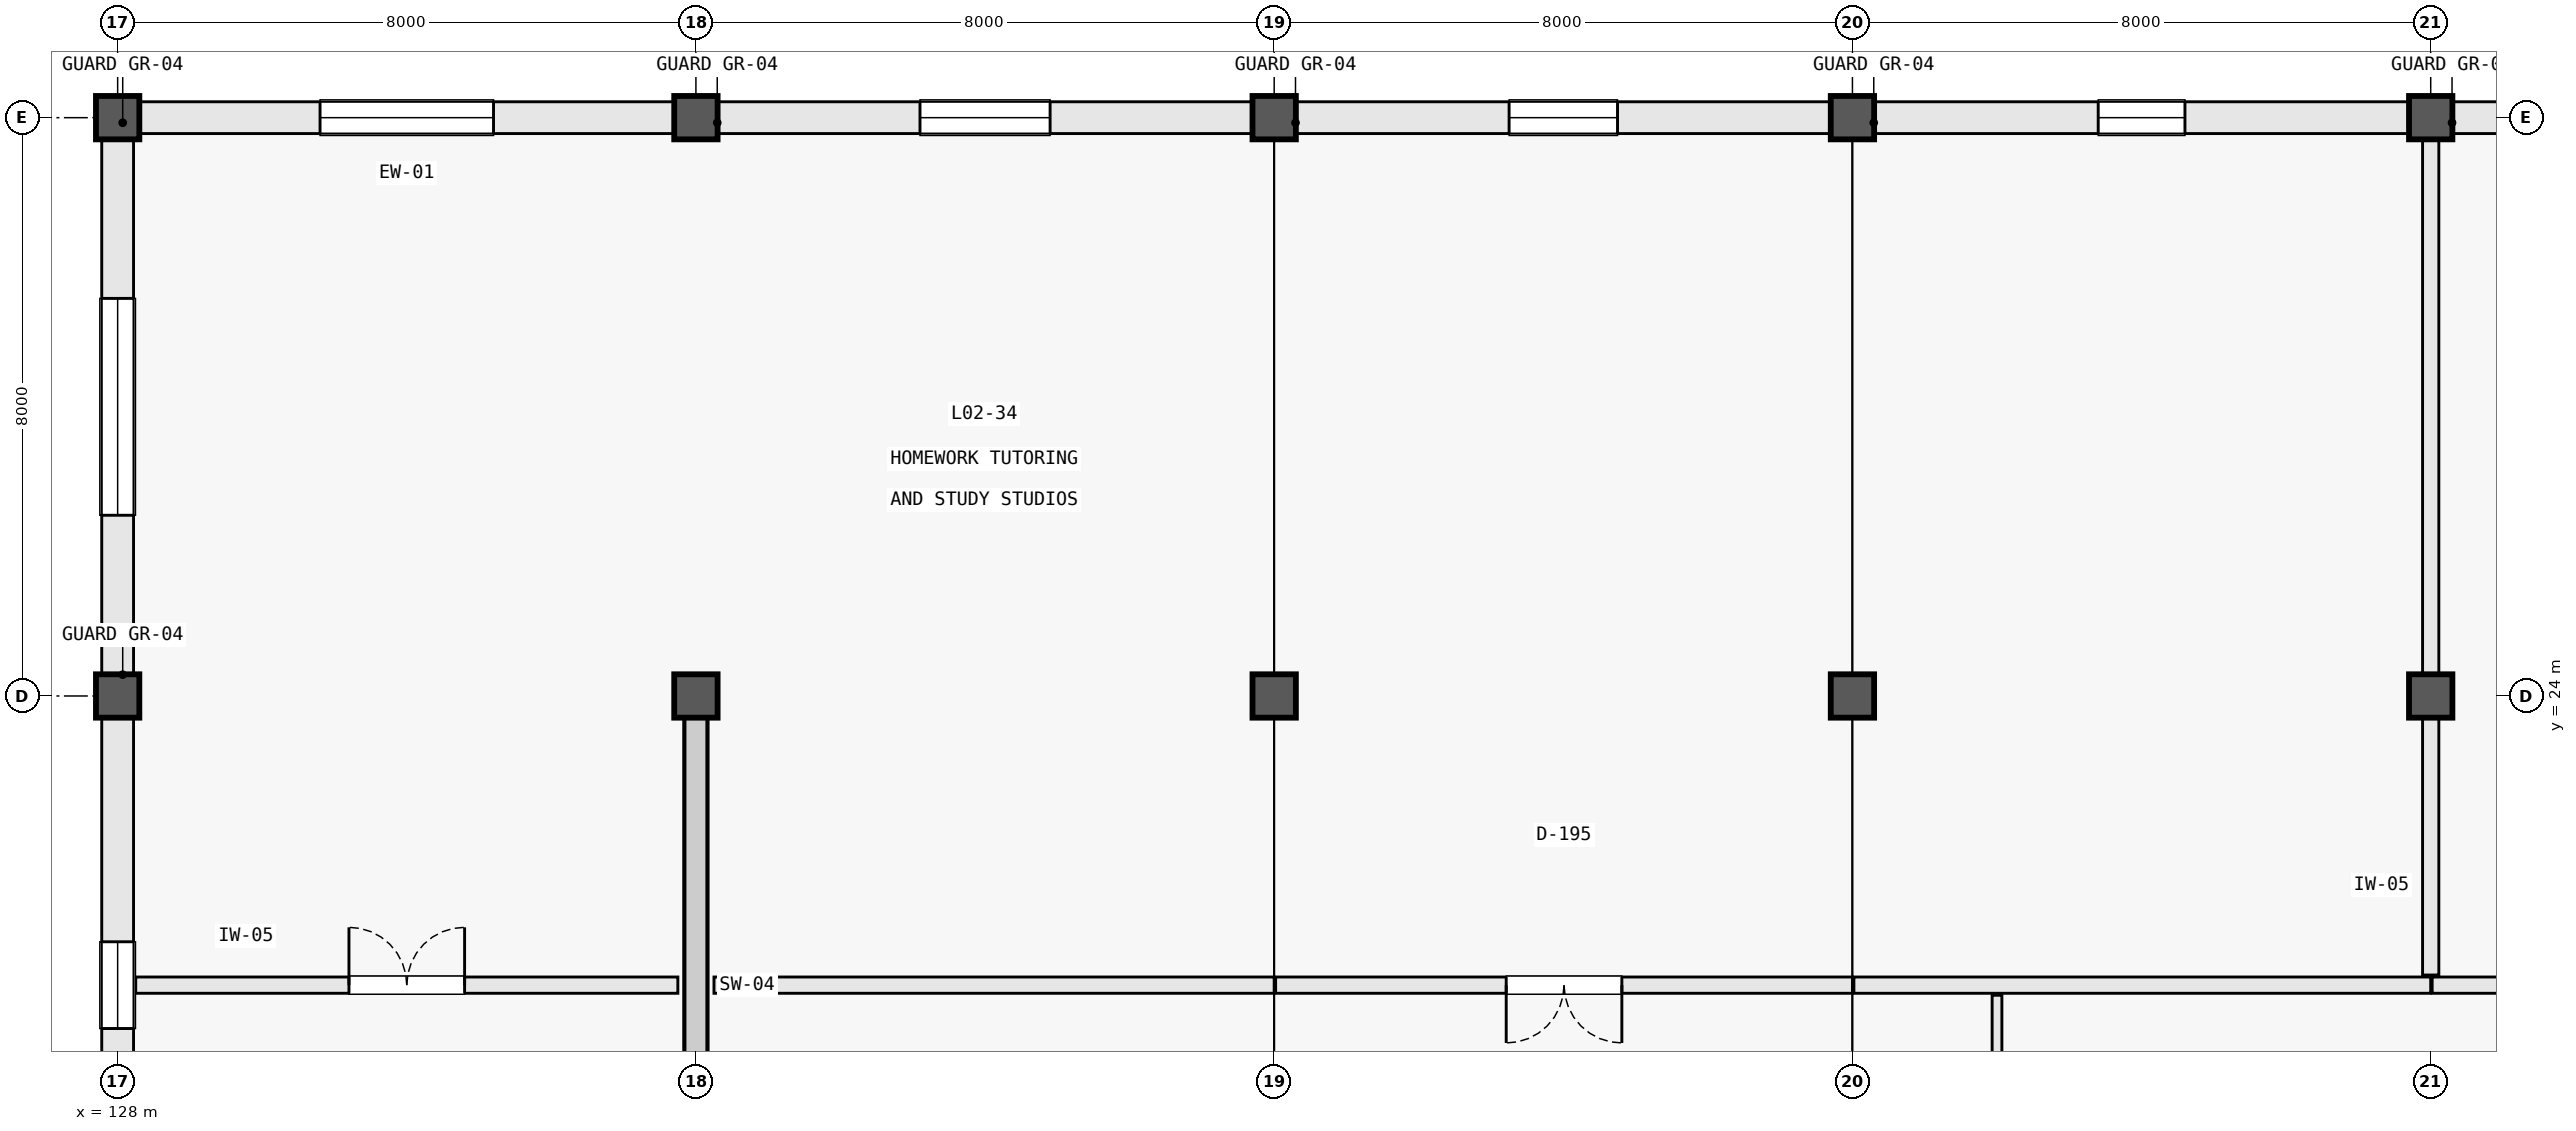
"""IFC4 building model, lengths in metres.
Left out: names, types, materials, properties, quantities, classifications, styles, units other than length and angle.
Written with IfcOpenShell. Run it as: python <this file> out.ifc"""

import sys

from ifc_helpers import new_model, si_unit, direction, frame, frame_2d, origin, origin_2d, place, context, subcontext, project, spatial, rectangle, extrude, element, fill, save


model = new_model("IFC4")
c1 = context("Model", 3, precision=1e-05, world=origin(), true_north=direction((0.0, 1.0)))
c2 = subcontext(c1, "Body", "Model", "MODEL_VIEW")
j1 = project(units=[si_unit("LENGTHUNIT", "METRE"), si_unit("PLANEANGLEUNIT", "RADIAN")], contexts=[c1])
p1 = place(None, origin())
s1 = spatial("IfcSite", under=j1, at=p1, CompositionType="ELEMENT")
p2 = place(p1, origin())
s2 = spatial("IfcBuilding", under=s1, at=p2, CompositionType="ELEMENT")
p3 = place(p2, frame((0.0, 0.0, 5.4)))
s3 = spatial("IfcBuildingStorey", under=s2, at=p3, CompositionType="ELEMENT", Elevation=5.4)
for number, where, z_axis, x_axis in (
    (1, (128.0, 24.0, 0.0), (0.0, 0.0, 1.0), (1.0, 0.0, 0.0)),
    (2, (128.0, 32.0, 0.0), (0.0, 0.0, 1.0), (1.0, 0.0, 0.0)),
    (3, (136.0, 24.0, 0.0), (0.0, 0.0, 1.0), (1.0, 0.0, 0.0)),
    (4, (136.0, 32.0, 0.0), (0.0, 0.0, 1.0), (1.0, 0.0, 0.0)),
    (5, (144.0, 24.0, 0.0), (0.0, 0.0, 1.0), (1.0, 0.0, 0.0)),
    (6, (144.0, 32.0, 0.0), (0.0, 0.0, 1.0), (1.0, 0.0, 0.0)),
    (7, (152.0, 24.0, 0.0), (0.0, 0.0, 1.0), (1.0, 0.0, 0.0)),
    (8, (152.0, 32.0, 0.0), (0.0, 0.0, 1.0), (1.0, 0.0, 0.0)),
    (9, (160.0, 24.0, 0.0), (0.0, 0.0, 1.0), (1.0, 0.0, 0.0)),
    (10, (160.0, 32.0, 0.0), (0.0, 0.0, 1.0), (1.0, 0.0, 0.0)),
):
    element("IfcColumn", number, at=place(p3, frame(where, z_axis=z_axis, x_axis=x_axis)), inside=s3, PredefinedType="COLUMN", context=c2, shape_type="SweptSolid", body=[
        extrude(rectangle(XDim=0.6, YDim=0.6, at=origin_2d()), origin(), (0.0, 0.0, 1.0), 5.1),
    ])
p4 = place(p3, frame((136.0, 16.3, 0.0), z_axis=(0.0, 0.0, 1.0), x_axis=(0.0, 1.0, 0.0)))
e11 = element("IfcWall", 11, at=p4, inside=s3, PredefinedType="SHEAR", context=c2, shape_type="SweptSolid", body=[
    extrude(rectangle(XDim=7.4, YDim=0.32, at=frame_2d((3.7, 0.0))), origin(), (0.0, 0.0, 1.0), 4.76),
])
p5 = place(p3, frame((135.705, 32.0, 0.0), z_axis=(0.0, 0.0, 1.0), x_axis=(-1.0, 0.0, 0.0)))
e12 = element("IfcWall", 12, at=p5, inside=s3, PredefinedType="STANDARD", context=c2, shape_type="SweptSolid", body=[
    extrude(rectangle(XDim=7.41, YDim=0.44, at=frame_2d((3.705, 0.0))), origin(), (0.0, 0.0, 1.0), 3.64),
])
p6 = place(p5, frame((2.505, 0.0, 0.72)))
e13 = element("IfcOpeningElement", 13, at=p6, cuts=e12, PredefinedType="OPENING", context=c2, shape_type="SweptSolid", body=[
    extrude(rectangle(XDim=2.4, YDim=2.6, at=frame_2d((1.2, 1.3))), frame((0.0, 0.232, 0.0), z_axis=(0.0, -1.0, 0.0), x_axis=(1.0, 0.0, 0.0)), (0.0, 0.0, 1.0), 0.464),
])
p7 = place(p3, frame((143.705, 32.0, 0.0), z_axis=(0.0, 0.0, 1.0), x_axis=(-1.0, 0.0, 0.0)))
e14 = element("IfcWall", 14, at=p7, inside=s3, PredefinedType="STANDARD", context=c2, shape_type="SweptSolid", body=[
    extrude(rectangle(XDim=7.41, YDim=0.44, at=frame_2d((3.705, 0.0))), origin(), (0.0, 0.0, 1.0), 3.64),
])
p8 = place(p7, frame((2.805, 0.0, 0.72)))
e15 = element("IfcOpeningElement", 15, at=p8, cuts=e14, PredefinedType="OPENING", context=c2, shape_type="SweptSolid", body=[
    extrude(rectangle(XDim=1.8, YDim=2.1, at=frame_2d((0.9, 1.05))), frame((0.0, 0.232, 0.0), z_axis=(0.0, -1.0, 0.0), x_axis=(1.0, 0.0, 0.0)), (0.0, 0.0, 1.0), 0.464),
])
p9 = place(p3, frame((151.705, 32.0, 0.0), z_axis=(0.0, 0.0, 1.0), x_axis=(-1.0, 0.0, 0.0)))
e16 = element("IfcWall", 16, at=p9, inside=s3, PredefinedType="STANDARD", context=c2, shape_type="SweptSolid", body=[
    extrude(rectangle(XDim=7.41, YDim=0.44, at=frame_2d((3.705, 0.0))), origin(), (0.0, 0.0, 1.0), 3.64),
])
p10 = place(p9, frame((2.955, 0.0, 0.72)))
e17 = element("IfcOpeningElement", 17, at=p10, cuts=e16, PredefinedType="OPENING", context=c2, shape_type="SweptSolid", body=[
    extrude(rectangle(XDim=1.5, YDim=1.8, at=frame_2d((0.75, 0.9))), frame((0.0, 0.232, 0.0), z_axis=(0.0, -1.0, 0.0), x_axis=(1.0, 0.0, 0.0)), (0.0, 0.0, 1.0), 0.464),
])
p11 = place(p3, frame((159.705, 32.0, 0.0), z_axis=(0.0, 0.0, 1.0), x_axis=(-1.0, 0.0, 0.0)))
e18 = element("IfcWall", 18, at=p11, inside=s3, PredefinedType="STANDARD", context=c2, shape_type="SweptSolid", body=[
    extrude(rectangle(XDim=7.41, YDim=0.44, at=frame_2d((3.705, 0.0))), origin(), (0.0, 0.0, 1.0), 3.64),
])
p12 = place(p11, frame((3.105, 0.0, 0.72)))
e19 = element("IfcOpeningElement", 19, at=p12, cuts=e18, PredefinedType="OPENING", context=c2, shape_type="SweptSolid", body=[
    extrude(rectangle(XDim=1.2, YDim=1.6, at=frame_2d((0.6, 0.8))), frame((0.0, 0.232, 0.0), z_axis=(0.0, -1.0, 0.0), x_axis=(1.0, 0.0, 0.0)), (0.0, 0.0, 1.0), 0.464),
])
p13 = place(p3, frame((167.705, 32.0, 0.0), z_axis=(0.0, 0.0, 1.0), x_axis=(-1.0, 0.0, 0.0)))
e20 = element("IfcWall", 20, at=p13, inside=s3, PredefinedType="STANDARD", context=c2, shape_type="SweptSolid", body=[
    extrude(rectangle(XDim=7.41, YDim=0.44, at=frame_2d((3.705, 0.0))), origin(), (0.0, 0.0, 1.0), 3.64),
])
p14 = place(p13, frame((2.205, 0.0, 0.72)))
e21 = element("IfcOpeningElement", 21, at=p14, cuts=e20, PredefinedType="OPENING", context=c2, shape_type="SweptSolid", body=[
    extrude(rectangle(XDim=3.0, YDim=2.1, at=frame_2d((1.5, 1.05))), frame((0.0, 0.232, 0.0), z_axis=(0.0, -1.0, 0.0), x_axis=(1.0, 0.0, 0.0)), (0.0, 0.0, 1.0), 0.464),
])
p15 = place(p3, frame((128.0, 23.705, 0.0), z_axis=(0.0, 0.0, 1.0), x_axis=(0.0, -1.0, 0.0)))
e22 = element("IfcWall", 22, at=p15, inside=s3, PredefinedType="STANDARD", context=c2, shape_type="SweptSolid", body=[
    extrude(rectangle(XDim=7.41, YDim=0.44, at=frame_2d((3.705, 0.0))), origin(), (0.0, 0.0, 1.0), 3.64),
])
p16 = place(p15, frame((3.105, 0.0, 0.72)))
e23 = element("IfcOpeningElement", 23, at=p16, cuts=e22, PredefinedType="OPENING", context=c2, shape_type="SweptSolid", body=[
    extrude(rectangle(XDim=1.2, YDim=1.6, at=frame_2d((0.6, 0.8))), frame((0.0, 0.232, 0.0), z_axis=(0.0, -1.0, 0.0), x_axis=(1.0, 0.0, 0.0)), (0.0, 0.0, 1.0), 0.464),
])
p17 = place(p3, frame((128.0, 31.705, 0.0), z_axis=(0.0, 0.0, 1.0), x_axis=(0.0, -1.0, 0.0)))
e24 = element("IfcWall", 24, at=p17, inside=s3, PredefinedType="STANDARD", context=c2, shape_type="SweptSolid", body=[
    extrude(rectangle(XDim=7.41, YDim=0.44, at=frame_2d((3.705, 0.0))), origin(), (0.0, 0.0, 1.0), 3.64),
])
p18 = place(p17, frame((2.205, 0.0, 0.72)))
e25 = element("IfcOpeningElement", 25, at=p18, cuts=e24, PredefinedType="OPENING", context=c2, shape_type="SweptSolid", body=[
    extrude(rectangle(XDim=3.0, YDim=2.1, at=frame_2d((1.5, 1.05))), frame((0.0, 0.232, 0.0), z_axis=(0.0, -1.0, 0.0), x_axis=(1.0, 0.0, 0.0)), (0.0, 0.0, 1.0), 0.464),
])
p19 = place(p3, frame((128.25, 20.0, 0.0), z_axis=(0.0, 0.0, 1.0), x_axis=(1.0, 0.0, 0.0)))
e26 = element("IfcWall", 26, at=p19, inside=s3, PredefinedType="PARTITIONING", context=c2, shape_type="SweptSolid", body=[
    extrude(rectangle(XDim=7.5, YDim=0.225, at=frame_2d((3.75, 0.0))), origin(), (0.0, 0.0, 1.0), 3.61),
])
p20 = place(p19, frame((2.95, 0.0, 0.0)))
e27 = element("IfcOpeningElement", 27, at=p20, cuts=e26, PredefinedType="OPENING", context=c2, shape_type="SweptSolid", body=[
    extrude(rectangle(XDim=1.6, YDim=2.2, at=frame_2d((0.8, 1.1))), frame((0.0, 0.125, 0.0), z_axis=(0.0, -1.0, 0.0), x_axis=(1.0, 0.0, 0.0)), (0.0, 0.0, 1.0), 0.249),
])
p21 = place(p3, frame((136.25, 20.0, 0.0), z_axis=(0.0, 0.0, 1.0), x_axis=(1.0, 0.0, 0.0)))
e28 = element("IfcWall", 28, at=p21, inside=s3, PredefinedType="PARTITIONING", context=c2, shape_type="SweptSolid", body=[
    extrude(rectangle(XDim=7.75, YDim=0.225, at=frame_2d((3.875, 0.0))), origin(), (0.0, 0.0, 1.0), 3.61),
])
p22 = place(p3, frame((144.02, 20.0, 0.0), z_axis=(0.0, 0.0, 1.0), x_axis=(1.0, 0.0, 0.0)))
e29 = element("IfcWall", 29, at=p22, inside=s3, PredefinedType="PARTITIONING", context=c2, shape_type="SweptSolid", body=[
    extrude(rectangle(XDim=7.98, YDim=0.225, at=frame_2d((3.99, 0.0))), origin(), (0.0, 0.0, 1.0), 3.61),
])
p23 = place(p22, frame((3.19, 0.0, 0.0)))
e30 = element("IfcOpeningElement", 30, at=p23, cuts=e29, PredefinedType="OPENING", context=c2, shape_type="SweptSolid", body=[
    extrude(rectangle(XDim=1.6, YDim=2.2, at=frame_2d((0.8, 1.1))), frame((0.0, 0.125, 0.0), z_axis=(0.0, -1.0, 0.0), x_axis=(1.0, 0.0, 0.0)), (0.0, 0.0, 1.0), 0.249),
])
p24 = place(p3, frame((152.02, 20.0, 0.0), z_axis=(0.0, 0.0, 1.0), x_axis=(1.0, 0.0, 0.0)))
e31 = element("IfcWall", 31, at=p24, inside=s3, PredefinedType="PARTITIONING", context=c2, shape_type="SweptSolid", body=[
    extrude(rectangle(XDim=7.98, YDim=0.225, at=frame_2d((3.99, 0.0))), origin(), (0.0, 0.0, 1.0), 3.61),
])
p25 = place(p3, frame((160.02, 20.0, 0.0), z_axis=(0.0, 0.0, 1.0), x_axis=(1.0, 0.0, 0.0)))
e32 = element("IfcWall", 32, at=p25, inside=s3, PredefinedType="PARTITIONING", context=c2, shape_type="SweptSolid", body=[
    extrude(rectangle(XDim=7.98, YDim=0.225, at=frame_2d((3.99, 0.0))), origin(), (0.0, 0.0, 1.0), 3.61),
])
p26 = place(p25, frame((3.53, 0.0, 0.0)))
e33 = element("IfcOpeningElement", 33, at=p26, cuts=e32, PredefinedType="OPENING", context=c2, shape_type="SweptSolid", body=[
    extrude(rectangle(XDim=0.92, YDim=2.1, at=frame_2d((0.46, 1.05))), frame((0.0, 0.125, 0.0), z_axis=(0.0, -1.0, 0.0), x_axis=(1.0, 0.0, 0.0)), (0.0, 0.0, 1.0), 0.249),
])
p27 = place(p3, frame((160.0, 20.14, 0.0), z_axis=(0.0, 0.0, 1.0), x_axis=(0.0, 1.0, 0.0)))
e34 = element("IfcWall", 34, at=p27, inside=s3, PredefinedType="PARTITIONING", context=c2, shape_type="SweptSolid", body=[
    extrude(rectangle(XDim=3.55, YDim=0.225, at=frame_2d((1.775, 0.0))), origin(), (0.0, 0.0, 1.0), 3.61),
])
p28 = place(p3, frame((160.0, 24.31, 0.0), z_axis=(0.0, 0.0, 1.0), x_axis=(0.0, 1.0, 0.0)))
e35 = element("IfcWall", 35, at=p28, inside=s3, PredefinedType="PARTITIONING", context=c2, shape_type="SweptSolid", body=[
    extrude(rectangle(XDim=7.38, YDim=0.225, at=frame_2d((3.69, 0.0))), origin(), (0.0, 0.0, 1.0), 3.61),
])
p29 = place(p3, frame((154.0, 16.02, 0.0), z_axis=(0.0, 0.0, 1.0), x_axis=(0.0, 1.0, 0.0)))
e36 = element("IfcWall", 36, at=p29, inside=s3, PredefinedType="PARTITIONING", context=c2, shape_type="SweptSolid", body=[
    extrude(rectangle(XDim=3.84, YDim=0.135, at=frame_2d((1.92, 0.0))), origin(), (0.0, 0.0, 1.0), 3.61),
])
p30 = place(p6, origin())
e37 = element("IfcWindow", 37, at=p30, inside=s3, PartitioningType="SINGLE_PANEL", PredefinedType="WINDOW", context=c2, shape_type="SweptSolid", body=[
    extrude(rectangle(XDim=2.4, YDim=2.6, at=frame_2d((1.2, 1.3))), frame((0.0, 0.03, 0.0), z_axis=(0.0, -1.0, 0.0), x_axis=(1.0, 0.0, 0.0)), (0.0, 0.0, 1.0), 0.06),
])
fill(e13, e37)
p31 = place(p8, origin())
e38 = element("IfcWindow", 38, at=p31, inside=s3, PartitioningType="SINGLE_PANEL", PredefinedType="WINDOW", context=c2, shape_type="SweptSolid", body=[
    extrude(rectangle(XDim=1.8, YDim=2.1, at=frame_2d((0.9, 1.05))), frame((0.0, 0.03, 0.0), z_axis=(0.0, -1.0, 0.0), x_axis=(1.0, 0.0, 0.0)), (0.0, 0.0, 1.0), 0.06),
])
fill(e15, e38)
p32 = place(p10, origin())
e39 = element("IfcWindow", 39, at=p32, inside=s3, PartitioningType="SINGLE_PANEL", PredefinedType="WINDOW", context=c2, shape_type="SweptSolid", body=[
    extrude(rectangle(XDim=1.5, YDim=1.8, at=frame_2d((0.75, 0.9))), frame((0.0, 0.03, 0.0), z_axis=(0.0, -1.0, 0.0), x_axis=(1.0, 0.0, 0.0)), (0.0, 0.0, 1.0), 0.06),
])
fill(e17, e39)
p33 = place(p12, origin())
e40 = element("IfcWindow", 40, at=p33, inside=s3, PartitioningType="SINGLE_PANEL", PredefinedType="WINDOW", context=c2, shape_type="SweptSolid", body=[
    extrude(rectangle(XDim=1.2, YDim=1.6, at=frame_2d((0.6, 0.8))), frame((0.0, 0.03, 0.0), z_axis=(0.0, -1.0, 0.0), x_axis=(1.0, 0.0, 0.0)), (0.0, 0.0, 1.0), 0.06),
])
fill(e19, e40)
p34 = place(p16, origin())
e41 = element("IfcWindow", 41, at=p34, inside=s3, PartitioningType="SINGLE_PANEL", PredefinedType="WINDOW", context=c2, shape_type="SweptSolid", body=[
    extrude(rectangle(XDim=1.2, YDim=1.6, at=frame_2d((0.6, 0.8))), frame((0.0, 0.03, 0.0), z_axis=(0.0, -1.0, 0.0), x_axis=(1.0, 0.0, 0.0)), (0.0, 0.0, 1.0), 0.06),
])
fill(e23, e41)
p35 = place(p18, origin())
e42 = element("IfcWindow", 42, at=p35, inside=s3, PartitioningType="SINGLE_PANEL", PredefinedType="WINDOW", context=c2, shape_type="SweptSolid", body=[
    extrude(rectangle(XDim=3.0, YDim=2.1, at=frame_2d((1.5, 1.05))), frame((0.0, 0.03, 0.0), z_axis=(0.0, -1.0, 0.0), x_axis=(1.0, 0.0, 0.0)), (0.0, 0.0, 1.0), 0.06),
])
fill(e25, e42)
p36 = place(p20, origin())
e43 = element("IfcDoor", 43, at=p36, inside=s3, OperationType="DOUBLE_DOOR_SINGLE_SWING", PredefinedType="DOOR", context=c2, shape_type="SweptSolid", body=[
    extrude(rectangle(XDim=1.6, YDim=2.2, at=frame_2d((0.8, 1.1))), frame((0.0, 0.025, 0.0), z_axis=(0.0, -1.0, 0.0), x_axis=(1.0, 0.0, 0.0)), (0.0, 0.0, 1.0), 0.05),
])
fill(e27, e43)
p37 = place(p23, frame((1.6, 0.0, 0.0), z_axis=(0.0, 0.0, 1.0), x_axis=(-1.0, 0.0, 0.0)))
e44 = element("IfcDoor", 44, at=p37, inside=s3, OperationType="DOUBLE_DOOR_SINGLE_SWING", PredefinedType="DOOR", context=c2, shape_type="SweptSolid", body=[
    extrude(rectangle(XDim=1.6, YDim=2.2, at=frame_2d((0.8, 1.1))), frame((0.0, 0.025, 0.0), z_axis=(0.0, -1.0, 0.0), x_axis=(1.0, 0.0, 0.0)), (0.0, 0.0, 1.0), 0.05),
])
fill(e30, e44)
save(model, sys.argv[1])
